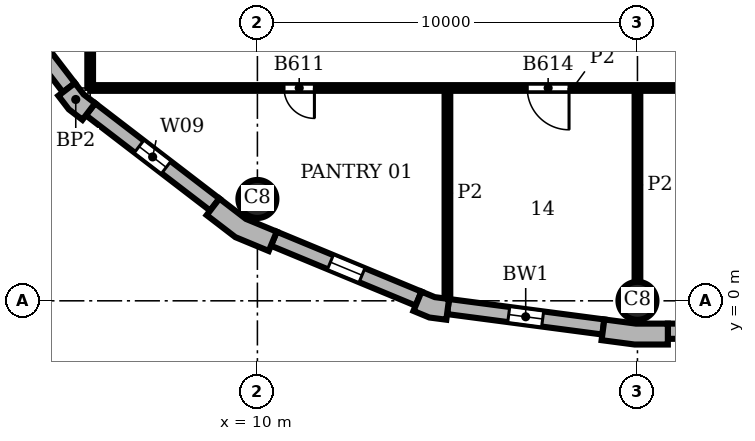
"""IFC4 building model, lengths in metres.
Left out: names, types, materials, properties, quantities, classifications, styles, units other than length and angle.
Written with IfcOpenShell. Run it as: python <this file> out.ifc"""

import sys

from ifc_helpers import new_model, si_unit, direction, frame, frame_2d, origin, origin_2d, place, context, subcontext, project, spatial, polyline, rectangle, circle, outline, extrude, element, fill, save


model = new_model("IFC4")
c1 = context("Model", 3, precision=1e-05, world=origin(), true_north=direction((0.0, 1.0)))
c2 = subcontext(c1, "Body", "Model", "MODEL_VIEW")
j1 = project(units=[si_unit("LENGTHUNIT", "METRE"), si_unit("PLANEANGLEUNIT", "RADIAN")], contexts=[c1])
p1 = place(None, origin())
s1 = spatial("IfcSite", under=j1, at=p1, CompositionType="ELEMENT")
p2 = place(p1, origin())
s2 = spatial("IfcBuilding", under=s1, at=p2, CompositionType="ELEMENT")
p3 = place(p2, frame((0.0, 0.0, 190.2)))
s3 = spatial("IfcBuildingStorey", under=s2, at=p3, CompositionType="ELEMENT", Elevation=190.2)
for number, where, z_axis, x_axis in (
    (1, (20.0, 0.0, 0.0), (0.0, 0.0, 1.0), (1.0, 0.0, 0.0)),
    (2, (10.0, 2.679, 0.0), (0.0, 0.0, 1.0), (1.0, 0.0, 0.0)),
):
    element("IfcColumn", number, at=place(p3, frame(where, z_axis=z_axis, x_axis=x_axis)), inside=s3, PredefinedType="COLUMN", context=c2, shape_type="SweptSolid", body=[
        extrude(circle(Radius=0.5, at=origin_2d()), origin(), (0.0, 0.0, 1.0), 3.9),
    ])
p4 = place(p3, origin())
e3 = element("IfcWall", 3, at=p4, inside=s3, PredefinedType="SOLIDWALL", context=c2, shape_type="SweptSolid", body=[
    extrude(outline(polyline([(19.076, -0.887), (19.057, -1.036), (19.925, -1.15), (20.8, -1.15), (20.8, -1.0), (20.8, -0.6), (19.961, -0.6), (19.128, -0.49), (19.076, -0.887)])), origin(), (0.0, 0.0, 1.0), 3.9),
])
e4 = element("IfcWall", 4, at=p4, inside=s3, PredefinedType="SOLIDWALL", context=c2, shape_type="SweptSolid", body=[
    extrude(outline(polyline([(4.882, 5.487), (4.763, 5.396), (5.038, 5.038), (5.396, 4.763), (5.487, 4.882), (5.731, 5.199), (5.43, 5.43), (5.199, 5.731), (4.882, 5.487)])), origin(), (0.0, 0.0, 1.0), 3.9),
])
e5 = element("IfcWall", 5, at=p4, inside=s3, PredefinedType="SOLIDWALL", context=c2, shape_type="SweptSolid", body=[
    extrude(outline(polyline([(8.757, 2.373), (8.665, 2.254), (9.42, 1.675), (10.299, 1.311), (10.356, 1.449), (10.51, 1.819), (9.698, 2.155), (9.0, 2.69), (8.757, 2.373)])), origin(), (0.0, 0.0, 1.0), 3.9),
])
e6 = element("IfcWall", 6, at=p4, inside=s3, PredefinedType="SOLIDWALL", context=c2, shape_type="SweptSolid", body=[
    extrude(outline(polyline([(14.164, -0.128), (14.106, -0.266), (14.523, -0.439), (14.971, -0.498), (14.99, -0.349), (15.043, 0.047), (14.667, 0.097), (14.317, 0.242), (14.164, -0.128)])), origin(), (0.0, 0.0, 1.0), 3.9),
])
p5 = place(p3, frame((20.8, -0.8, 0.0), z_axis=(0.0, 0.0, 1.0), x_axis=(1.0, 0.0, 0.0)))
e7 = element("IfcWall", 7, at=p5, inside=s3, PredefinedType="SOLIDWALL", context=c2, shape_type="SweptSolid", body=[
    extrude(rectangle(XDim=38.4, YDim=0.4, at=frame_2d((19.2, 0.0))), origin(), (0.0, 0.0, 1.0), 3.9),
])
p6 = place(p5, frame((3.75, 0.0, 0.9)))
e8 = element("IfcOpeningElement", 8, at=p6, cuts=e7, PredefinedType="OPENING", context=c2, shape_type="SweptSolid", body=[
    extrude(rectangle(XDim=0.9, YDim=2.35, at=frame_2d((0.45, 1.175))), frame((0.0, 0.21, 0.0), z_axis=(0.0, -1.0, 0.0), x_axis=(1.0, 0.0, 0.0)), (0.0, 0.0, 1.0), 0.42),
])
p7 = place(p5, frame((13.75, 0.0, 0.9)))
e9 = element("IfcOpeningElement", 9, at=p7, cuts=e7, PredefinedType="OPENING", context=c2, shape_type="SweptSolid", body=[
    extrude(rectangle(XDim=0.9, YDim=2.35, at=frame_2d((0.45, 1.175))), frame((0.0, 0.21, 0.0), z_axis=(0.0, -1.0, 0.0), x_axis=(1.0, 0.0, 0.0)), (0.0, 0.0, 1.0), 0.42),
])
p8 = place(p5, frame((23.75, 0.0, 0.9)))
e10 = element("IfcOpeningElement", 10, at=p8, cuts=e7, PredefinedType="OPENING", context=c2, shape_type="SweptSolid", body=[
    extrude(rectangle(XDim=0.9, YDim=2.35, at=frame_2d((0.45, 1.175))), frame((0.0, 0.21, 0.0), z_axis=(0.0, -1.0, 0.0), x_axis=(1.0, 0.0, 0.0)), (0.0, 0.0, 1.0), 0.42),
])
p9 = place(p5, frame((33.75, 0.0, 0.9)))
e11 = element("IfcOpeningElement", 11, at=p9, cuts=e7, PredefinedType="OPENING", context=c2, shape_type="SweptSolid", body=[
    extrude(rectangle(XDim=0.9, YDim=2.35, at=frame_2d((0.45, 1.175))), frame((0.0, 0.21, 0.0), z_axis=(0.0, -1.0, 0.0), x_axis=(1.0, 0.0, 0.0)), (0.0, 0.0, 1.0), 0.42),
])
p10 = place(p3, frame((2.532, 8.878, 0.0), z_axis=(0.0, 0.0, 1.0), x_axis=(0.608759824817, -0.793354571229, 0.0)))
e12 = element("IfcWall", 12, at=p10, inside=s3, PredefinedType="SOLIDWALL", context=c2, shape_type="SweptSolid", body=[
    extrude(rectangle(XDim=4.121, YDim=0.4, at=frame_2d((2.061, 0.0))), origin(), (0.0, 0.0, 1.0), 3.9),
])
p11 = place(p10, frame((1.611, 0.0, 0.9)))
e13 = element("IfcOpeningElement", 13, at=p11, cuts=e12, PredefinedType="OPENING", context=c2, shape_type="SweptSolid", body=[
    extrude(rectangle(XDim=0.9, YDim=2.35, at=frame_2d((0.45, 1.175))), frame((0.0, 0.21, 0.0), z_axis=(0.0, -1.0, 0.0), x_axis=(1.0, 0.0, 0.0)), (0.0, 0.0, 1.0), 0.42),
])
p12 = place(p3, frame((5.609, 5.041, 0.0), z_axis=(0.0, 0.0, 1.0), x_axis=(0.793354571229, -0.608759824817, 0.0)))
e14 = element("IfcWall", 14, at=p12, inside=s3, PredefinedType="SOLIDWALL", context=c2, shape_type="SweptSolid", body=[
    extrude(rectangle(XDim=4.121, YDim=0.4, at=frame_2d((2.061, 0.0))), origin(), (0.0, 0.0, 1.0), 3.9),
])
p13 = place(p12, frame((1.611, 0.0, 0.9)))
e15 = element("IfcOpeningElement", 15, at=p13, cuts=e14, PredefinedType="OPENING", context=c2, shape_type="SweptSolid", body=[
    extrude(rectangle(XDim=0.9, YDim=2.35, at=frame_2d((0.45, 1.175))), frame((0.0, 0.21, 0.0), z_axis=(0.0, -1.0, 0.0), x_axis=(1.0, 0.0, 0.0)), (0.0, 0.0, 1.0), 0.42),
])
p14 = place(p3, frame((10.433, 1.634, 0.0), z_axis=(0.0, 0.0, 1.0), x_axis=(0.923863744394, -0.382721546029, 0.0)))
e16 = element("IfcWall", 16, at=p14, inside=s3, PredefinedType="SOLIDWALL", context=c2, shape_type="SweptSolid", body=[
    extrude(rectangle(XDim=4.121, YDim=0.4, at=frame_2d((2.061, 0.0))), origin(), (0.0, 0.0, 1.0), 3.9),
])
p15 = place(p14, frame((1.611, 0.0, 0.9)))
e17 = element("IfcOpeningElement", 17, at=p15, cuts=e16, PredefinedType="OPENING", context=c2, shape_type="SweptSolid", body=[
    extrude(rectangle(XDim=0.9, YDim=2.35, at=frame_2d((0.45, 1.175))), frame((0.0, 0.21, 0.0), z_axis=(0.0, -1.0, 0.0), x_axis=(1.0, 0.0, 0.0)), (0.0, 0.0, 1.0), 0.42),
])
p16 = place(p3, frame((15.017, -0.151, 0.0), z_axis=(0.0, 0.0, 1.0), x_axis=(0.991446429508, -0.130514280502, 0.0)))
e18 = element("IfcWall", 18, at=p16, inside=s3, PredefinedType="SOLIDWALL", context=c2, shape_type="SweptSolid", body=[
    extrude(rectangle(XDim=4.121, YDim=0.4, at=frame_2d((2.061, 0.0))), origin(), (0.0, 0.0, 1.0), 3.9),
])
p17 = place(p16, frame((1.611, 0.0, 0.9)))
e19 = element("IfcOpeningElement", 19, at=p17, cuts=e18, PredefinedType="OPENING", context=c2, shape_type="SweptSolid", body=[
    extrude(rectangle(XDim=0.9, YDim=2.35, at=frame_2d((0.45, 1.175))), frame((0.0, 0.21, 0.0), z_axis=(0.0, -1.0, 0.0), x_axis=(1.0, 0.0, 0.0)), (0.0, 0.0, 1.0), 0.42),
])
p18 = place(p3, frame((5.6, 5.6, 0.0), z_axis=(0.0, 0.0, 1.0), x_axis=(0.0, 1.0, 0.0)))
e20 = element("IfcWall", 20, at=p18, inside=s3, PredefinedType="PARTITIONING", context=c2, shape_type="SweptSolid", body=[
    extrude(rectangle(XDim=22.4, YDim=0.15, at=frame_2d((11.2, 0.0))), origin(), (0.0, 0.0, 1.0), 3.58),
])
p19 = place(p18, frame((4.35, 0.0, 0.0)))
e21 = element("IfcOpeningElement", 21, at=p19, cuts=e20, PredefinedType="OPENING", context=c2, shape_type="SweptSolid", body=[
    extrude(rectangle(XDim=1.0, YDim=2.1, at=frame_2d((0.5, 1.05))), frame((0.0, 0.085, 0.0), z_axis=(0.0, -1.0, 0.0), x_axis=(1.0, 0.0, 0.0)), (0.0, 0.0, 1.0), 0.17),
])
p20 = place(p18, frame((11.0, 0.0, 0.0)))
e22 = element("IfcOpeningElement", 22, at=p20, cuts=e20, PredefinedType="OPENING", context=c2, shape_type="SweptSolid", body=[
    extrude(rectangle(XDim=1.1, YDim=2.1, at=frame_2d((0.55, 1.05))), frame((0.0, 0.085, 0.0), z_axis=(0.0, -1.0, 0.0), x_axis=(1.0, 0.0, 0.0)), (0.0, 0.0, 1.0), 0.17),
])
p21 = place(p3, frame((15.0, 0.063, 0.0), z_axis=(0.0, 0.0, 1.0), x_axis=(0.0, 1.0, 0.0)))
e23 = element("IfcWall", 23, at=p21, inside=s3, PredefinedType="PARTITIONING", context=c2, shape_type="SweptSolid", body=[
    extrude(rectangle(XDim=5.537, YDim=0.15, at=frame_2d((2.769, 0.0))), origin(), (0.0, 0.0, 1.0), 3.58),
])
p22 = place(p3, frame((20.0, 0.5, 0.0), z_axis=(0.0, 0.0, 1.0), x_axis=(0.0, 1.0, 0.0)))
e24 = element("IfcWall", 24, at=p22, inside=s3, PredefinedType="PARTITIONING", context=c2, shape_type="SweptSolid", body=[
    extrude(rectangle(XDim=5.1, YDim=0.15, at=frame_2d((2.55, 0.0))), origin(), (0.0, 0.0, 1.0), 3.58),
])
p23 = place(p3, frame((5.6, 5.6, 0.0), z_axis=(0.0, 0.0, 1.0), x_axis=(1.0, 0.0, 0.0)))
e25 = element("IfcWall", 25, at=p23, inside=s3, PredefinedType="PARTITIONING", context=c2, shape_type="SweptSolid", body=[
    extrude(rectangle(XDim=25.4, YDim=0.15, at=frame_2d((12.7, 0.0))), origin(), (0.0, 0.0, 1.0), 3.58),
])
p24 = place(p23, frame((5.1, 0.0, 0.0)))
e26 = element("IfcOpeningElement", 26, at=p24, cuts=e25, PredefinedType="OPENING", context=c2, shape_type="SweptSolid", body=[
    extrude(rectangle(XDim=0.8, YDim=2.1, at=frame_2d((0.4, 1.05))), frame((0.0, 0.085, 0.0), z_axis=(0.0, -1.0, 0.0), x_axis=(1.0, 0.0, 0.0)), (0.0, 0.0, 1.0), 0.17),
])
p25 = place(p23, frame((11.5, 0.0, 0.0)))
e27 = element("IfcOpeningElement", 27, at=p25, cuts=e25, PredefinedType="OPENING", context=c2, shape_type="SweptSolid", body=[
    extrude(rectangle(XDim=1.1, YDim=2.1, at=frame_2d((0.55, 1.05))), frame((0.0, 0.085, 0.0), z_axis=(0.0, -1.0, 0.0), x_axis=(1.0, 0.0, 0.0)), (0.0, 0.0, 1.0), 0.17),
])
p26 = place(p23, frame((19.25, 0.0, 0.0)))
e28 = element("IfcOpeningElement", 28, at=p26, cuts=e25, PredefinedType="OPENING", context=c2, shape_type="SweptSolid", body=[
    extrude(rectangle(XDim=1.0, YDim=2.1, at=frame_2d((0.5, 1.05))), frame((0.0, 0.085, 0.0), z_axis=(0.0, -1.0, 0.0), x_axis=(1.0, 0.0, 0.0)), (0.0, 0.0, 1.0), 0.17),
])
p27 = place(p13, origin())
e29 = element("IfcWindow", 29, at=p27, inside=s3, PartitioningType="SINGLE_PANEL", PredefinedType="WINDOW", context=c2, shape_type="SweptSolid", body=[
    extrude(rectangle(XDim=0.9, YDim=2.35, at=frame_2d((0.45, 1.175))), frame((0.0, 0.16, 0.0), z_axis=(0.0, -1.0, 0.0), x_axis=(1.0, 0.0, 0.0)), (0.0, 0.0, 1.0), 0.06),
])
fill(e15, e29)
p28 = place(p15, origin())
e30 = element("IfcWindow", 30, at=p28, inside=s3, PartitioningType="SINGLE_PANEL", PredefinedType="WINDOW", context=c2, shape_type="SweptSolid", body=[
    extrude(rectangle(XDim=0.9, YDim=2.35, at=frame_2d((0.45, 1.175))), frame((0.0, 0.16, 0.0), z_axis=(0.0, -1.0, 0.0), x_axis=(1.0, 0.0, 0.0)), (0.0, 0.0, 1.0), 0.06),
])
fill(e17, e30)
p29 = place(p17, origin())
e31 = element("IfcWindow", 31, at=p29, inside=s3, PartitioningType="SINGLE_PANEL", PredefinedType="WINDOW", context=c2, shape_type="SweptSolid", body=[
    extrude(rectangle(XDim=0.9, YDim=2.35, at=frame_2d((0.45, 1.175))), frame((0.0, 0.16, 0.0), z_axis=(0.0, -1.0, 0.0), x_axis=(1.0, 0.0, 0.0)), (0.0, 0.0, 1.0), 0.06),
])
fill(e19, e31)
p30 = place(p24, frame((0.8, 0.0, 0.0), z_axis=(0.0, 0.0, 1.0), x_axis=(-1.0, 0.0, 0.0)))
e32 = element("IfcDoor", 32, at=p30, inside=s3, OperationType="SINGLE_SWING_LEFT", PredefinedType="DOOR", context=c2, shape_type="SweptSolid", body=[
    extrude(rectangle(XDim=0.8, YDim=2.1, at=frame_2d((0.4, 1.05))), frame((0.0, 0.025, 0.0), z_axis=(0.0, -1.0, 0.0), x_axis=(1.0, 0.0, 0.0)), (0.0, 0.0, 1.0), 0.05),
])
fill(e26, e32)
p31 = place(p25, frame((1.1, 0.0, 0.0), z_axis=(0.0, 0.0, 1.0), x_axis=(-1.0, 0.0, 0.0)))
e33 = element("IfcDoor", 33, at=p31, inside=s3, OperationType="SINGLE_SWING_LEFT", PredefinedType="DOOR", context=c2, shape_type="SweptSolid", body=[
    extrude(rectangle(XDim=1.1, YDim=2.1, at=frame_2d((0.55, 1.05))), frame((0.0, 0.025, 0.0), z_axis=(0.0, -1.0, 0.0), x_axis=(1.0, 0.0, 0.0)), (0.0, 0.0, 1.0), 0.05),
])
fill(e27, e33)
save(model, sys.argv[1])
